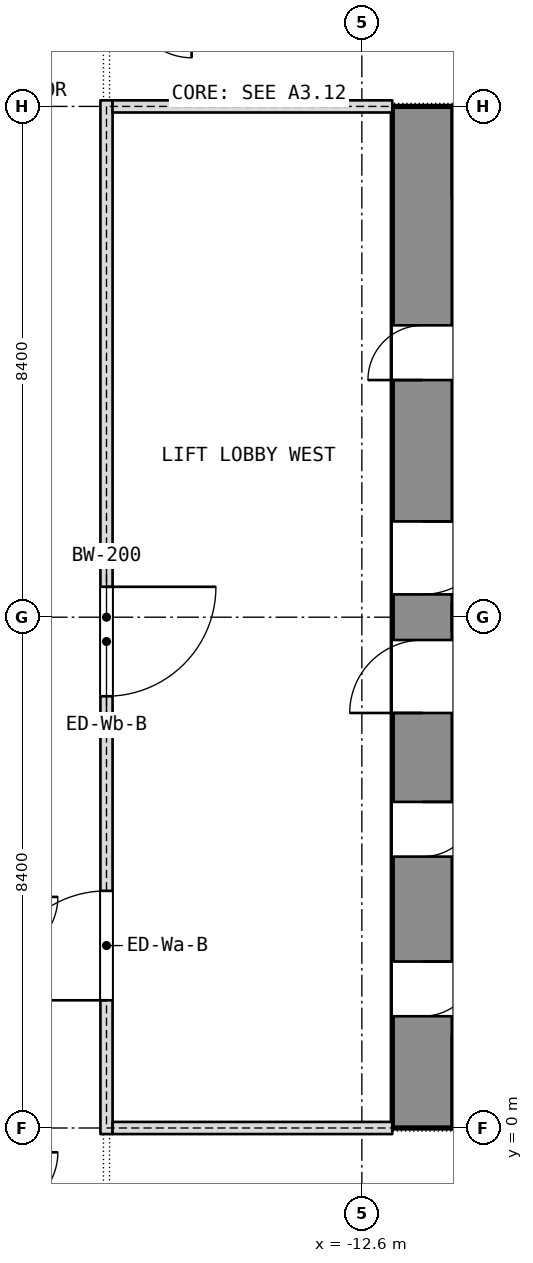
"""IFC4 building model, lengths in metres.
Left out: names, types, materials, properties, quantities, classifications, styles, units other than length and angle.
Written with IfcOpenShell. Run it as: python <this file> out.ifc"""

import sys

from ifc_helpers import new_model, si_unit, direction, frame, frame_2d, origin, place, context, subcontext, project, spatial, rectangle, extrude, element, fill, save


model = new_model("IFC4")
c1 = context("Model", 3, precision=1e-05, world=origin(), true_north=direction((0.0, 1.0)))
c2 = subcontext(c1, "Body", "Model", "MODEL_VIEW")
j1 = project(units=[si_unit("LENGTHUNIT", "METRE"), si_unit("PLANEANGLEUNIT", "RADIAN")], contexts=[c1])
p1 = place(None, origin())
s1 = spatial("IfcSite", under=j1, at=p1, CompositionType="ELEMENT")
p2 = place(p1, origin())
s2 = spatial("IfcBuilding", under=s1, at=p2, CompositionType="ELEMENT")
p3 = place(p2, frame((0.0, 0.0, 144.5)))
s3 = spatial("IfcBuildingStorey", under=s2, at=p3, CompositionType="ELEMENT", Elevation=144.5)
p4 = place(p3, frame((-11.6, 0.0, 0.0), z_axis=(0.0, 0.0, 1.0), x_axis=(0.0, 1.0, 0.0)))
e1 = element("IfcWall", 1, at=p4, inside=s3, PredefinedType="SHEAR", context=c2, shape_type="SweptSolid", body=[
    extrude(rectangle(XDim=16.8, YDim=1.0, at=frame_2d((8.4, 0.0))), origin(), (0.0, 0.0, 1.0), 3.6),
])
p5 = place(p4, frame((1.837, 0.0, 0.0)))
e2 = element("IfcOpeningElement", 2, at=p5, cuts=e1, PredefinedType="OPENING", context=c2, shape_type="SweptSolid", body=[
    extrude(rectangle(XDim=0.9, YDim=2.1, at=frame_2d((0.45, 1.05))), frame((0.0, 0.5, 0.0), z_axis=(0.0, -1.0, 0.0), x_axis=(1.0, 0.0, 0.0)), (0.0, 0.0, 1.0), 1.0),
])
p6 = place(p4, frame((4.462, 0.0, 0.0)))
e3 = element("IfcOpeningElement", 3, at=p6, cuts=e1, PredefinedType="OPENING", context=c2, shape_type="SweptSolid", body=[
    extrude(rectangle(XDim=0.9, YDim=2.1, at=frame_2d((0.45, 1.05))), frame((0.0, 0.5, 0.0), z_axis=(0.0, -1.0, 0.0), x_axis=(1.0, 0.0, 0.0)), (0.0, 0.0, 1.0), 1.0),
])
p7 = place(p4, frame((6.825, 0.0, 0.0)))
e4 = element("IfcOpeningElement", 4, at=p7, cuts=e1, PredefinedType="OPENING", context=c2, shape_type="SweptSolid", body=[
    extrude(rectangle(XDim=1.2, YDim=2.1, at=frame_2d((0.6, 1.05))), frame((0.0, 0.5, 0.0), z_axis=(0.0, -1.0, 0.0), x_axis=(1.0, 0.0, 0.0)), (0.0, 0.0, 1.0), 1.0),
])
p8 = place(p4, frame((12.3, 0.0, 0.0)))
e5 = element("IfcOpeningElement", 5, at=p8, cuts=e1, PredefinedType="OPENING", context=c2, shape_type="SweptSolid", body=[
    extrude(rectangle(XDim=0.9, YDim=2.1, at=frame_2d((0.45, 1.05))), frame((0.0, 0.5, 0.0), z_axis=(0.0, -1.0, 0.0), x_axis=(1.0, 0.0, 0.0)), (0.0, 0.0, 1.0), 1.0),
])
p9 = place(p4, frame((8.775, 0.0, 0.0)))
e6 = element("IfcOpeningElement", 6, at=p9, cuts=e1, PredefinedType="OPENING", context=c2, shape_type="SweptSolid", body=[
    extrude(rectangle(XDim=1.2, YDim=2.1, at=frame_2d((0.6, 1.05))), frame((0.0, 0.5, 0.0), z_axis=(0.0, -1.0, 0.0), x_axis=(1.0, 0.0, 0.0)), (0.0, 0.0, 1.0), 1.0),
])
p10 = place(p3, frame((-11.1, 8.4, 0.0), z_axis=(0.0, 0.0, 1.0), x_axis=(1.0, 0.0, 0.0)))
e7 = element("IfcWall", 7, at=p10, inside=s3, PredefinedType="SHEAR", context=c2, shape_type="SweptSolid", body=[
    extrude(rectangle(XDim=6.675, YDim=0.45, at=frame_2d((3.337, 0.0))), origin(), (0.0, 0.0, 1.0), 3.6),
])
p11 = place(p3, frame((-16.8, -0.1, 0.0), z_axis=(0.0, 0.0, 1.0), x_axis=(0.0, 1.0, 0.0)))
e8 = element("IfcWall", 8, at=p11, inside=s3, PredefinedType="PARTITIONING", context=c2, shape_type="SweptSolid", body=[
    extrude(rectangle(XDim=17.0, YDim=0.2, at=frame_2d((8.5, 0.0))), origin(), (0.0, 0.0, 1.0), 3.34),
])
p12 = place(p11, frame((2.2, 0.0, 0.0)))
e9 = element("IfcOpeningElement", 9, at=p12, cuts=e8, PredefinedType="OPENING", context=c2, shape_type="SweptSolid", body=[
    extrude(rectangle(XDim=1.8, YDim=2.1, at=frame_2d((0.9, 1.05))), frame((0.0, 0.1, 0.0), z_axis=(0.0, -1.0, 0.0), x_axis=(1.0, 0.0, 0.0)), (0.0, 0.0, 1.0), 0.2),
])
p13 = place(p11, frame((7.2, 0.0, 0.0)))
e10 = element("IfcOpeningElement", 10, at=p13, cuts=e8, PredefinedType="OPENING", context=c2, shape_type="SweptSolid", body=[
    extrude(rectangle(XDim=1.8, YDim=2.1, at=frame_2d((0.9, 1.05))), frame((0.0, 0.1, 0.0), z_axis=(0.0, -1.0, 0.0), x_axis=(1.0, 0.0, 0.0)), (0.0, 0.0, 1.0), 0.2),
])
for number, where, z_axis, x_axis in (
    (11, (-16.7, 0.0, 0.0), (0.0, 0.0, 1.0), (1.0, 0.0, 0.0)),
    (12, (-16.7, 16.8, 0.0), (0.0, 0.0, 1.0), (1.0, 0.0, 0.0)),
):
    element("IfcWall", number, at=place(p3, frame(where, z_axis=z_axis, x_axis=x_axis)), inside=s3, PredefinedType="PARTITIONING", context=c2, shape_type="SweptSolid", body=[
        extrude(rectangle(XDim=4.6, YDim=0.2, at=frame_2d((2.3, 0.0))), origin(), (0.0, 0.0, 1.0), 2.89),
    ])
p14 = place(p5, origin())
e13 = element("IfcDoor", 13, at=p14, inside=s3, OperationType="SINGLE_SWING_LEFT", PredefinedType="DOOR", context=c2, shape_type="SweptSolid", body=[
    extrude(rectangle(XDim=0.9, YDim=2.1, at=frame_2d((0.45, 1.05))), frame((0.0, 0.025, 0.0), z_axis=(0.0, -1.0, 0.0), x_axis=(1.0, 0.0, 0.0)), (0.0, 0.0, 1.0), 0.05),
])
fill(e2, e13)
p15 = place(p6, origin())
e14 = element("IfcDoor", 14, at=p15, inside=s3, OperationType="SINGLE_SWING_LEFT", PredefinedType="DOOR", context=c2, shape_type="SweptSolid", body=[
    extrude(rectangle(XDim=0.9, YDim=2.1, at=frame_2d((0.45, 1.05))), frame((0.0, 0.025, 0.0), z_axis=(0.0, -1.0, 0.0), x_axis=(1.0, 0.0, 0.0)), (0.0, 0.0, 1.0), 0.05),
])
fill(e3, e14)
p16 = place(p7, origin())
e15 = element("IfcDoor", 15, at=p16, inside=s3, OperationType="SINGLE_SWING_LEFT", PredefinedType="DOOR", context=c2, shape_type="SweptSolid", body=[
    extrude(rectangle(XDim=1.2, YDim=2.1, at=frame_2d((0.6, 1.05))), frame((0.0, 0.025, 0.0), z_axis=(0.0, -1.0, 0.0), x_axis=(1.0, 0.0, 0.0)), (0.0, 0.0, 1.0), 0.05),
])
fill(e4, e15)
p17 = place(p8, origin())
e16 = element("IfcDoor", 16, at=p17, inside=s3, OperationType="SINGLE_SWING_LEFT", PredefinedType="DOOR", context=c2, shape_type="SweptSolid", body=[
    extrude(rectangle(XDim=0.9, YDim=2.1, at=frame_2d((0.45, 1.05))), frame((0.0, 0.025, 0.0), z_axis=(0.0, -1.0, 0.0), x_axis=(1.0, 0.0, 0.0)), (0.0, 0.0, 1.0), 0.05),
])
fill(e5, e16)
p18 = place(p9, origin())
e17 = element("IfcDoor", 17, at=p18, inside=s3, OperationType="SINGLE_SWING_LEFT", PredefinedType="DOOR", context=c2, shape_type="SweptSolid", body=[
    extrude(rectangle(XDim=1.2, YDim=2.1, at=frame_2d((0.6, 1.05))), frame((0.0, 0.025, 0.0), z_axis=(0.0, -1.0, 0.0), x_axis=(1.0, 0.0, 0.0)), (0.0, 0.0, 1.0), 0.05),
])
fill(e6, e17)
p19 = place(p12, origin())
e18 = element("IfcDoor", 18, at=p19, inside=s3, OperationType="DOUBLE_DOOR_SINGLE_SWING", PredefinedType="DOOR", context=c2, shape_type="SweptSolid", body=[
    extrude(rectangle(XDim=1.8, YDim=2.1, at=frame_2d((0.9, 1.05))), frame((0.0, 0.025, 0.0), z_axis=(0.0, -1.0, 0.0), x_axis=(1.0, 0.0, 0.0)), (0.0, 0.0, 1.0), 0.05),
])
fill(e9, e18)
p20 = place(p13, origin())
e19 = element("IfcDoor", 19, at=p20, inside=s3, OperationType="DOUBLE_DOOR_SINGLE_SWING", PredefinedType="DOOR", context=c2, shape_type="SweptSolid", body=[
    extrude(rectangle(XDim=1.8, YDim=2.1, at=frame_2d((0.9, 1.05))), frame((0.0, 0.025, 0.0), z_axis=(0.0, -1.0, 0.0), x_axis=(1.0, 0.0, 0.0)), (0.0, 0.0, 1.0), 0.05),
])
fill(e10, e19)
save(model, sys.argv[1])
